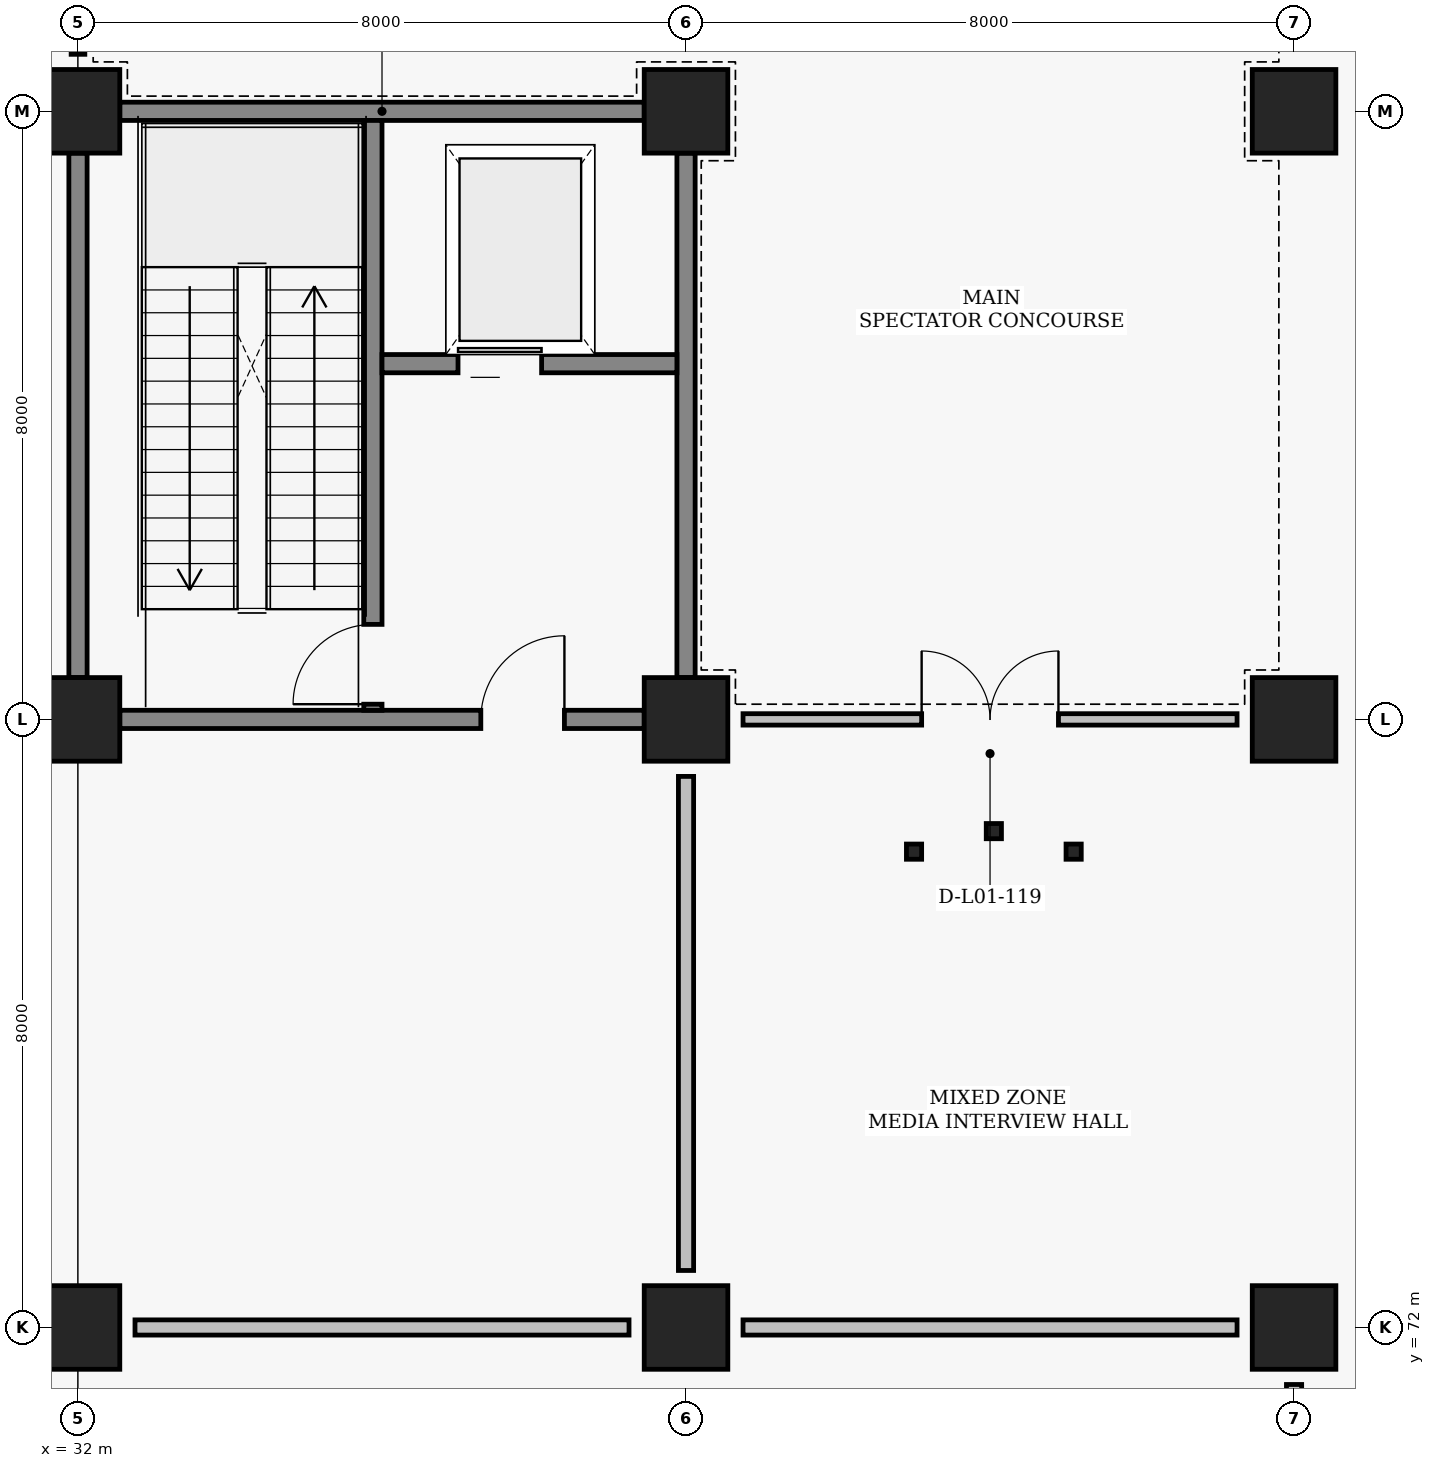
"""IFC4 building model, lengths in metres.
Left out: names, types, materials, properties, quantities, classifications, styles, units other than length and angle.
Written with IfcOpenShell. Run it as: python <this file> out.ifc"""

import sys

from ifc_helpers import new_model, si_unit, direction, frame, frame_2d, origin, origin_2d, place, context, subcontext, project, spatial, rectangle, hollow_rectangle, extrude, element, fill, save


model = new_model("IFC4")
c1 = context("Model", 3, precision=1e-05, world=origin(), true_north=direction((0.0, 1.0)))
c2 = subcontext(c1, "Body", "Model", "MODEL_VIEW")
j1 = project(units=[si_unit("LENGTHUNIT", "METRE"), si_unit("PLANEANGLEUNIT", "RADIAN")], contexts=[c1])
p1 = place(None, origin())
s1 = spatial("IfcSite", under=j1, at=p1, CompositionType="ELEMENT")
p2 = place(p1, origin())
s2 = spatial("IfcBuilding", under=s1, at=p2, CompositionType="ELEMENT")
p3 = place(p2, origin())
s3 = spatial("IfcBuildingStorey", under=s2, at=p3, CompositionType="ELEMENT", Elevation=0.0)
for number, where, z_axis, x_axis in (
    (1, (32.0, 72.0, 0.0), (0.0, 0.0, 1.0), (1.0, 0.0, 0.0)),
    (2, (32.0, 80.0, 0.0), (0.0, 0.0, 1.0), (1.0, 0.0, 0.0)),
    (3, (32.0, 88.0, 0.0), (0.0, 0.0, 1.0), (1.0, 0.0, 0.0)),
    (4, (40.0, 72.0, 0.0), (0.0, 0.0, 1.0), (1.0, 0.0, 0.0)),
    (5, (40.0, 80.0, 0.0), (0.0, 0.0, 1.0), (1.0, 0.0, 0.0)),
    (6, (40.0, 88.0, 0.0), (0.0, 0.0, 1.0), (1.0, 0.0, 0.0)),
    (7, (48.0, 72.0, 0.0), (0.0, 0.0, 1.0), (1.0, 0.0, 0.0)),
    (8, (48.0, 80.0, 0.0), (0.0, 0.0, 1.0), (1.0, 0.0, 0.0)),
    (9, (48.0, 88.0, 0.0), (0.0, 0.0, 1.0), (1.0, 0.0, 0.0)),
):
    element("IfcColumn", number, at=place(p3, frame(where, z_axis=z_axis, x_axis=x_axis)), inside=s3, PredefinedType="COLUMN", context=c2, shape_type="SweptSolid", body=[
        extrude(rectangle(XDim=1.1, YDim=1.1, at=origin_2d()), origin(), (0.0, 0.0, 1.0), 4.8),
    ])
p4 = place(p3, frame((32.55, 80.0, 0.0), z_axis=(0.0, 0.0, 1.0), x_axis=(1.0, 0.0, 0.0)))
e10 = element("IfcWall", 10, at=p4, inside=s3, PredefinedType="SHEAR", context=c2, shape_type="SweptSolid", body=[
    extrude(rectangle(XDim=6.9, YDim=0.24, at=frame_2d((3.45, 0.0))), origin(), (0.0, 0.0, 1.0), 3.62),
])
p5 = place(p4, frame((4.75, 0.0, 0.0)))
e11 = element("IfcOpeningElement", 11, at=p5, cuts=e10, PredefinedType="OPENING", context=c2, shape_type="SweptSolid", body=[
    extrude(rectangle(XDim=1.1, YDim=2.2, at=frame_2d((0.55, 1.1))), frame((0.0, 0.13, 0.0), z_axis=(0.0, -1.0, 0.0), x_axis=(1.0, 0.0, 0.0)), (0.0, 0.0, 1.0), 0.26),
])
for number, where, z_axis, x_axis in (
    (12, (32.55, 88.0, 0.0), (0.0, 0.0, 1.0), (1.0, 0.0, 0.0)),
    (13, (32.0, 80.55, 0.0), (0.0, 0.0, 1.0), (0.0, 1.0, 0.0)),
):
    element("IfcWall", number, at=place(p3, frame(where, z_axis=z_axis, x_axis=x_axis)), inside=s3, PredefinedType="SHEAR", context=c2, shape_type="SweptSolid", body=[
        extrude(rectangle(XDim=6.9, YDim=0.24, at=frame_2d((3.45, 0.0))), origin(), (0.0, 0.0, 1.0), 3.77),
    ])
p6 = place(p3, frame((40.0, 80.55, 0.0), z_axis=(0.0, 0.0, 1.0), x_axis=(0.0, 1.0, 0.0)))
e14 = element("IfcWall", 14, at=p6, inside=s3, PredefinedType="SHEAR", context=c2, shape_type="SweptSolid", body=[
    extrude(rectangle(XDim=6.9, YDim=0.24, at=frame_2d((3.45, 0.0))), origin(), (0.0, 0.0, 1.0), 3.62),
])
p7 = place(p3, frame((35.88, 80.12, 0.0), z_axis=(0.0, 0.0, 1.0), x_axis=(0.0, 1.0, 0.0)))
e15 = element("IfcWall", 15, at=p7, inside=s3, PredefinedType="SHEAR", context=c2, shape_type="SweptSolid", body=[
    extrude(rectangle(XDim=7.76, YDim=0.24, at=frame_2d((3.88, 0.0))), origin(), (0.0, 0.0, 1.0), 3.97),
])
p8 = place(p7, frame((0.08, 0.0, 0.0)))
e16 = element("IfcOpeningElement", 16, at=p8, cuts=e15, PredefinedType="OPENING", context=c2, shape_type="SweptSolid", body=[
    extrude(rectangle(XDim=1.05, YDim=2.15, at=frame_2d((0.525, 1.075))), frame((0.0, 0.13, 0.0), z_axis=(0.0, -1.0, 0.0), x_axis=(1.0, 0.0, 0.0)), (0.0, 0.0, 1.0), 0.26),
])
p9 = place(p3, frame((36.0, 84.68, 0.0), z_axis=(0.0, 0.0, 1.0), x_axis=(1.0, 0.0, 0.0)))
e17 = element("IfcWall", 17, at=p9, inside=s3, PredefinedType="SHEAR", context=c2, shape_type="SweptSolid", body=[
    extrude(rectangle(XDim=3.88, YDim=0.24, at=frame_2d((1.94, 0.0))), origin(), (0.0, 0.0, 1.0), 3.77),
])
p10 = place(p9, frame((1.0, 0.0, 0.0)))
e18 = element("IfcOpeningElement", 18, at=p10, cuts=e17, PredefinedType="OPENING", context=c2, shape_type="SweptSolid", body=[
    extrude(rectangle(XDim=1.1, YDim=2.15, at=frame_2d((0.55, 1.075))), frame((0.0, 0.13, 0.0), z_axis=(0.0, -1.0, 0.0), x_axis=(1.0, 0.0, 0.0)), (0.0, 0.0, 1.0), 0.26),
])
for number, where, z_axis, x_axis in (
    (19, (43.0, 78.26, 0.0), (0.0, 0.0, 1.0), (1.0, 0.0, 0.0)),
    (20, (45.1, 78.26, 0.0), (0.0, 0.0, 1.0), (1.0, 0.0, 0.0)),
    (21, (44.05, 78.53, 0.0), (0.0, 0.0, 1.0), (1.0, 0.0, 0.0)),
):
    element("IfcColumn", number, at=place(p3, frame(where, z_axis=z_axis, x_axis=x_axis)), inside=s3, PredefinedType="COLUMN", context=c2, shape_type="SweptSolid", body=[
        extrude(hollow_rectangle(XDim=0.2, YDim=0.2, WallThickness=0.009, at=origin_2d()), origin(), (0.0, 0.0, 1.0), 4.8),
    ])
p11 = place(p3, frame((32.75, 72.0, 0.0), z_axis=(0.0, 0.0, 1.0), x_axis=(1.0, 0.0, 0.0)))
e22 = element("IfcWall", 22, at=p11, inside=s3, PredefinedType="PARTITIONING", context=c2, shape_type="SweptSolid", body=[
    extrude(rectangle(XDim=6.5, YDim=0.2, at=frame_2d((3.25, 0.0))), origin(), (0.0, 0.0, 1.0), 3.87),
])
p12 = place(p3, frame((48.0, 64.75, 0.0), z_axis=(0.0, 0.0, 1.0), x_axis=(0.0, 1.0, 0.0)))
e23 = element("IfcWall", 23, at=p12, inside=s3, PredefinedType="PARTITIONING", context=c2, shape_type="SweptSolid", body=[
    extrude(rectangle(XDim=6.5, YDim=0.2, at=frame_2d((3.25, 0.0))), origin(), (0.0, 0.0, 1.0), 3.77),
])
p13 = place(p3, frame((40.75, 72.0, 0.0), z_axis=(0.0, 0.0, 1.0), x_axis=(1.0, 0.0, 0.0)))
e24 = element("IfcWall", 24, at=p13, inside=s3, PredefinedType="PARTITIONING", context=c2, shape_type="SweptSolid", body=[
    extrude(rectangle(XDim=6.5, YDim=0.2, at=frame_2d((3.25, 0.0))), origin(), (0.0, 0.0, 1.0), 3.87),
])
p14 = place(p3, frame((40.0, 72.75, 0.0), z_axis=(0.0, 0.0, 1.0), x_axis=(0.0, 1.0, 0.0)))
e25 = element("IfcWall", 25, at=p14, inside=s3, PredefinedType="PARTITIONING", context=c2, shape_type="SweptSolid", body=[
    extrude(rectangle(XDim=6.5, YDim=0.2, at=frame_2d((3.25, 0.0))), origin(), (0.0, 0.0, 1.0), 3.77),
])
p15 = place(p3, frame((32.0, 88.75, 0.0), z_axis=(0.0, 0.0, 1.0), x_axis=(0.0, 1.0, 0.0)))
e26 = element("IfcWall", 26, at=p15, inside=s3, PredefinedType="PARTITIONING", context=c2, shape_type="SweptSolid", body=[
    extrude(rectangle(XDim=6.5, YDim=0.18, at=frame_2d((3.25, 0.0))), origin(), (0.0, 0.0, 1.0), 3.77),
])
p16 = place(p15, frame((2.5, 0.0, 0.0)))
e27 = element("IfcOpeningElement", 27, at=p16, cuts=e26, PredefinedType="OPENING", context=c2, shape_type="SweptSolid", body=[
    extrude(rectangle(XDim=1.5, YDim=2.2, at=frame_2d((0.75, 1.1))), frame((0.0, 0.1, 0.0), z_axis=(0.0, -1.0, 0.0), x_axis=(1.0, 0.0, 0.0)), (0.0, 0.0, 1.0), 0.2),
])
p17 = place(p3, frame((40.75, 80.0, 0.0), z_axis=(0.0, 0.0, 1.0), x_axis=(1.0, 0.0, 0.0)))
e28 = element("IfcWall", 28, at=p17, inside=s3, PredefinedType="PARTITIONING", context=c2, shape_type="SweptSolid", body=[
    extrude(rectangle(XDim=6.5, YDim=0.15, at=frame_2d((3.25, 0.0))), origin(), (0.0, 0.0, 1.0), 3.62),
])
p18 = place(p17, frame((2.35, 0.0, 0.0)))
e29 = element("IfcOpeningElement", 29, at=p18, cuts=e28, PredefinedType="OPENING", context=c2, shape_type="SweptSolid", body=[
    extrude(rectangle(XDim=1.8, YDim=2.3, at=frame_2d((0.9, 1.15))), frame((0.0, 0.085, 0.0), z_axis=(0.0, -1.0, 0.0), x_axis=(1.0, 0.0, 0.0)), (0.0, 0.0, 1.0), 0.17),
])
p19 = place(p5, origin())
e30 = element("IfcDoor", 30, at=p19, inside=s3, OperationType="SINGLE_SWING_RIGHT", PredefinedType="DOOR", context=c2, shape_type="SweptSolid", body=[
    extrude(rectangle(XDim=1.1, YDim=2.2, at=frame_2d((0.55, 1.1))), frame((0.0, 0.025, 0.0), z_axis=(0.0, -1.0, 0.0), x_axis=(1.0, 0.0, 0.0)), (0.0, 0.0, 1.0), 0.05),
])
fill(e11, e30)
p20 = place(p8, origin())
e31 = element("IfcDoor", 31, at=p20, inside=s3, OperationType="SINGLE_SWING_LEFT", PredefinedType="DOOR", context=c2, shape_type="SweptSolid", body=[
    extrude(rectangle(XDim=1.05, YDim=2.15, at=frame_2d((0.525, 1.075))), frame((0.0, 0.025, 0.0), z_axis=(0.0, -1.0, 0.0), x_axis=(1.0, 0.0, 0.0)), (0.0, 0.0, 1.0), 0.05),
])
fill(e16, e31)
p21 = place(p10, origin())
e32 = element("IfcDoor", 32, at=p21, inside=s3, OperationType="SLIDING_TO_LEFT", PredefinedType="DOOR", context=c2, shape_type="SweptSolid", body=[
    extrude(rectangle(XDim=1.1, YDim=2.15, at=frame_2d((0.55, 1.075))), frame((0.0, 0.025, 0.0), z_axis=(0.0, -1.0, 0.0), x_axis=(1.0, 0.0, 0.0)), (0.0, 0.0, 1.0), 0.05),
])
fill(e18, e32)
p22 = place(p18, origin())
e33 = element("IfcDoor", 33, at=p22, inside=s3, OperationType="DOUBLE_SWING_LEFT", PredefinedType="DOOR", context=c2, shape_type="SweptSolid", body=[
    extrude(rectangle(XDim=1.8, YDim=2.3, at=frame_2d((0.9, 1.15))), frame((0.0, 0.025, 0.0), z_axis=(0.0, -1.0, 0.0), x_axis=(1.0, 0.0, 0.0)), (0.0, 0.0, 1.0), 0.05),
])
fill(e29, e33)
save(model, sys.argv[1])
